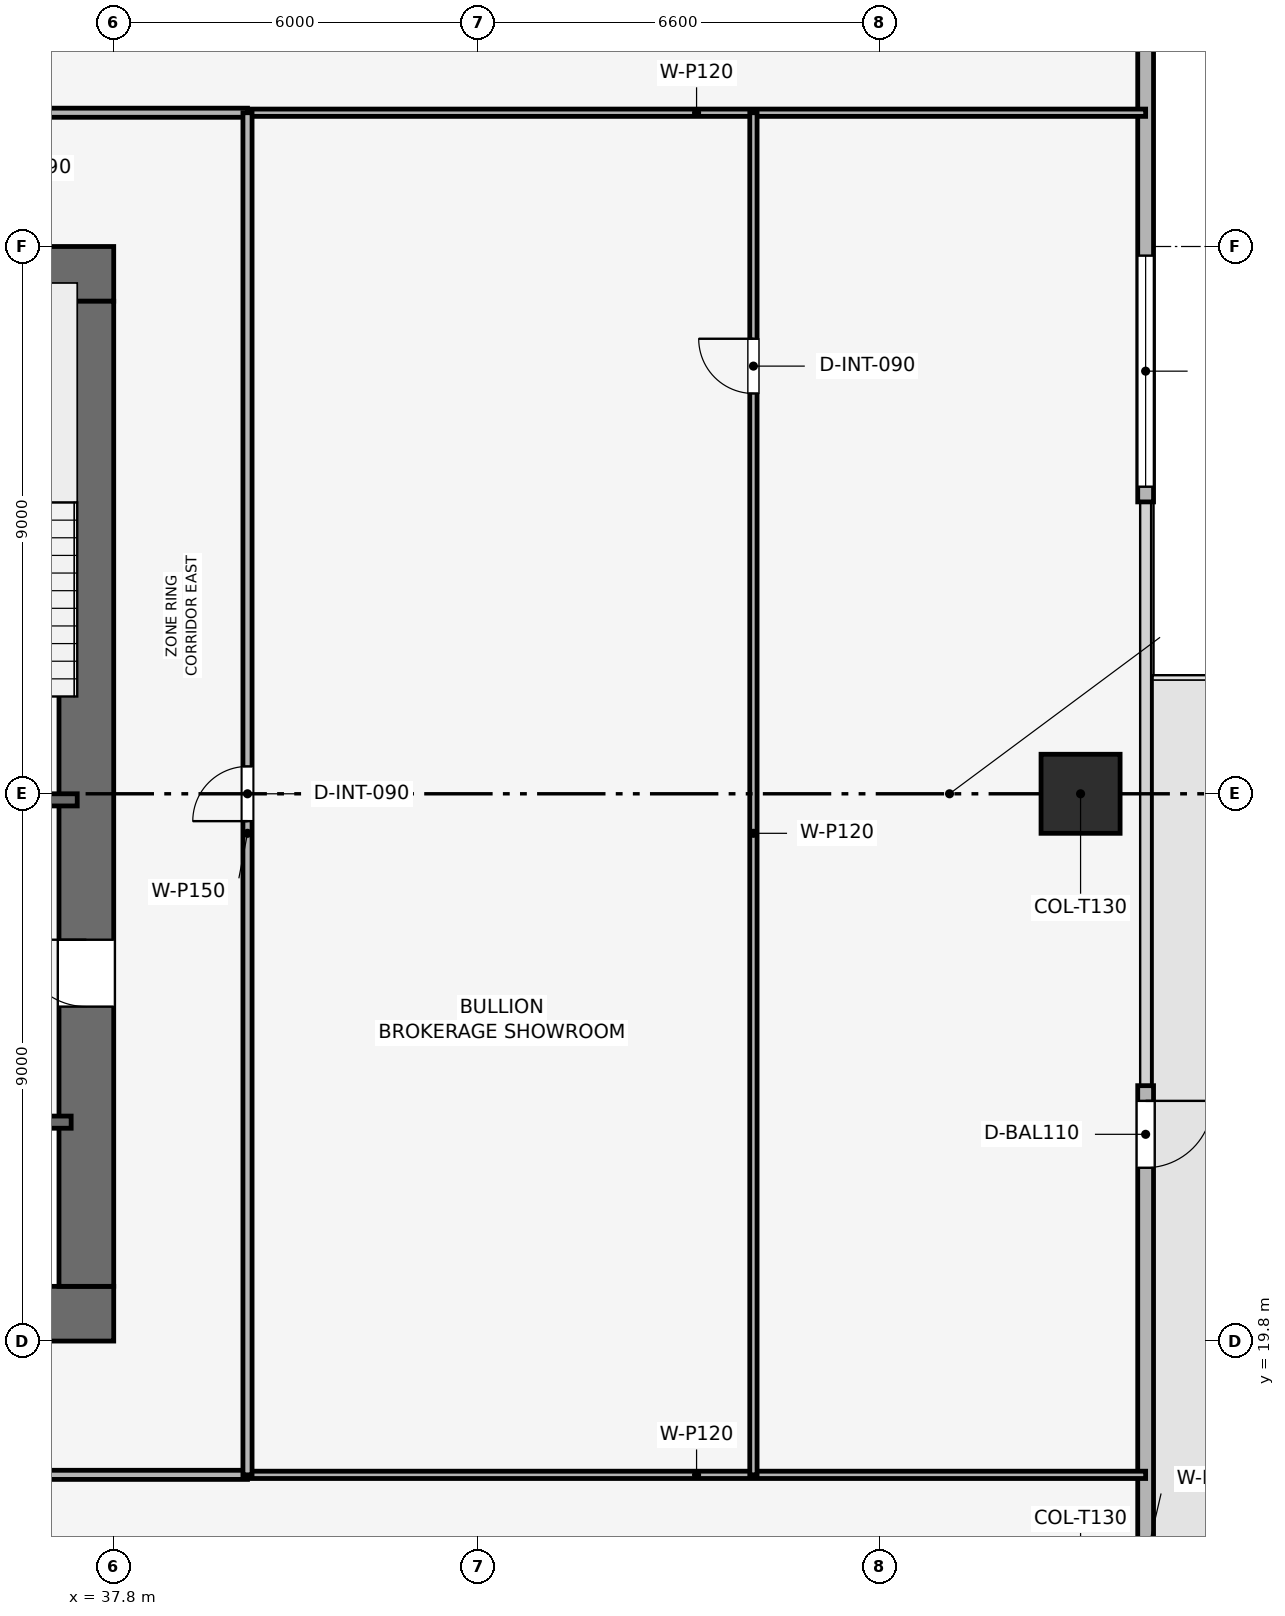
"""IFC4 building model, lengths in metres.
Left out: names, types, materials, properties, quantities, classifications, styles, units other than length and angle.
Written with IfcOpenShell. Run it as: python <this file> out.ifc"""

import sys

from ifc_helpers import new_model, si_unit, direction, frame, frame_2d, origin, origin_2d, place, context, subcontext, project, spatial, rectangle, extrude, element, fill, save


model = new_model("IFC4")
c1 = context("Model", 3, precision=1e-05, world=origin(), true_north=direction((0.0, 1.0)))
c2 = subcontext(c1, "Body", "Model", "MODEL_VIEW")
j1 = project(units=[si_unit("LENGTHUNIT", "METRE"), si_unit("PLANEANGLEUNIT", "RADIAN")], contexts=[c1])
p1 = place(None, origin())
s1 = spatial("IfcSite", under=j1, at=p1, CompositionType="ELEMENT")
p2 = place(p1, origin())
s2 = spatial("IfcBuilding", under=s1, at=p2, CompositionType="ELEMENT")
p3 = place(p2, frame((0.0, 0.0, 125.1)))
s3 = spatial("IfcBuildingStorey", under=s2, at=p3, CompositionType="ELEMENT", Elevation=125.1)
p4 = place(p3, frame((19.8, 20.25, 0.0), z_axis=(0.0, 0.0, 1.0), x_axis=(1.0, 0.0, 0.0)))
e1 = element("IfcWall", 1, at=p4, inside=s3, PredefinedType="SHEAR", context=c2, shape_type="SweptSolid", body=[
    extrude(rectangle(XDim=18.0, YDim=0.9, at=frame_2d((9.0, 0.0))), origin(), (0.0, 0.0, 1.0), 3.9),
])
p5 = place(p4, frame((8.4, 0.0, 0.0)))
e2 = element("IfcOpeningElement", 2, at=p5, cuts=e1, PredefinedType="OPENING", context=c2, shape_type="SweptSolid", body=[
    extrude(rectangle(XDim=1.2, YDim=2.2, at=frame_2d((0.6, 1.1))), frame((0.0, 0.46, 0.0), z_axis=(0.0, -1.0, 0.0), x_axis=(1.0, 0.0, 0.0)), (0.0, 0.0, 1.0), 0.92),
])
p6 = place(p3, frame((19.8, 37.35, 0.0), z_axis=(0.0, 0.0, 1.0), x_axis=(1.0, 0.0, 0.0)))
e3 = element("IfcWall", 3, at=p6, inside=s3, PredefinedType="SHEAR", context=c2, shape_type="SweptSolid", body=[
    extrude(rectangle(XDim=18.0, YDim=0.9, at=frame_2d((9.0, 0.0))), origin(), (0.0, 0.0, 1.0), 3.9),
])
p7 = place(p6, frame((7.05, 0.0, 0.0)))
e4 = element("IfcOpeningElement", 4, at=p7, cuts=e3, PredefinedType="OPENING", context=c2, shape_type="SweptSolid", body=[
    extrude(rectangle(XDim=1.1, YDim=2.15, at=frame_2d((0.55, 1.075))), frame((0.0, 0.46, 0.0), z_axis=(0.0, -1.0, 0.0), x_axis=(1.0, 0.0, 0.0)), (0.0, 0.0, 1.0), 0.92),
])
p8 = place(p3, frame((37.35, 20.7, 0.0), z_axis=(0.0, 0.0, 1.0), x_axis=(0.0, 1.0, 0.0)))
e5 = element("IfcWall", 5, at=p8, inside=s3, PredefinedType="SHEAR", context=c2, shape_type="SweptSolid", body=[
    extrude(rectangle(XDim=16.2, YDim=0.9, at=frame_2d((8.1, 0.0))), origin(), (0.0, 0.0, 1.0), 3.9),
])
p9 = place(p8, frame((4.6, 0.0, 0.0)))
e6 = element("IfcOpeningElement", 6, at=p9, cuts=e5, PredefinedType="OPENING", context=c2, shape_type="SweptSolid", body=[
    extrude(rectangle(XDim=1.1, YDim=2.15, at=frame_2d((0.55, 1.075))), frame((0.0, 0.46, 0.0), z_axis=(0.0, -1.0, 0.0), x_axis=(1.0, 0.0, 0.0)), (0.0, 0.0, 1.0), 0.92),
])
p10 = place(p3, frame((53.7, 28.8, 0.003), z_axis=(0.0, 0.0, 1.0), x_axis=(1.0, 0.0, 0.0)))
e7 = element("IfcColumn", 7, at=p10, inside=s3, PredefinedType="COLUMN", context=c2, shape_type="SweptSolid", body=[
    extrude(rectangle(XDim=1.3, YDim=1.3, at=origin_2d()), origin(), (0.0, 0.0, 1.0), 3.644),
])
p11 = place(p3, frame((54.77, 47.7, 0.0), z_axis=(0.0, 0.0, 1.0), x_axis=(0.0, -1.0, 0.0)))
e8 = element("IfcWall", 8, at=p11, inside=s3, PredefinedType="SOLIDWALL", context=c2, shape_type="SweptSolid", body=[
    extrude(rectangle(XDim=14.1, YDim=0.26, at=frame_2d((7.05, 0.0))), origin(), (0.0, 0.0, 1.0), 3.65),
])
p12 = place(p11, frame((10.05, 0.0, 0.9)))
e9 = element("IfcOpeningElement", 9, at=p12, cuts=e8, PredefinedType="OPENING", context=c2, shape_type="SweptSolid", body=[
    extrude(rectangle(XDim=3.8, YDim=1.9, at=frame_2d((1.9, 0.95))), frame((0.0, 0.14, 0.0), z_axis=(0.0, -1.0, 0.0), x_axis=(1.0, 0.0, 0.0)), (0.0, 0.0, 1.0), 0.28),
])
p13 = place(p3, frame((54.77, 24.0, 0.0), z_axis=(0.0, 0.0, 1.0), x_axis=(0.0, -1.0, 0.0)))
e10 = element("IfcWall", 10, at=p13, inside=s3, PredefinedType="SOLIDWALL", context=c2, shape_type="SweptSolid", body=[
    extrude(rectangle(XDim=14.1, YDim=0.26, at=frame_2d((7.05, 0.0))), origin(), (0.0, 0.0, 1.0), 3.65),
])
p14 = place(p13, frame((0.25, 0.0, 0.0)))
e11 = element("IfcOpeningElement", 11, at=p14, cuts=e10, PredefinedType="OPENING", context=c2, shape_type="SweptSolid", body=[
    extrude(rectangle(XDim=1.1, YDim=2.2, at=frame_2d((0.55, 1.1))), frame((0.0, 0.14, 0.0), z_axis=(0.0, -1.0, 0.0), x_axis=(1.0, 0.0, 0.0)), (0.0, 0.0, 1.0), 0.28),
])
p15 = place(p3, frame((34.05, 28.7, 0.0), z_axis=(0.0, 0.0, 1.0), x_axis=(1.0, 0.0, 0.0)))
e12 = element("IfcWall", 12, at=p15, inside=s3, PredefinedType="SHEAR", context=c2, shape_type="SweptSolid", body=[
    extrude(rectangle(XDim=3.15, YDim=0.2, at=frame_2d((1.575, 0.0))), origin(), (0.0, 0.0, 1.0), 3.65),
])
p16 = place(p15, frame((0.8, 0.0, 0.0)))
e13 = element("IfcOpeningElement", 13, at=p16, cuts=e12, PredefinedType="OPENING", context=c2, shape_type="SweptSolid", body=[
    extrude(rectangle(XDim=1.0, YDim=2.1, at=frame_2d((0.5, 1.05))), frame((0.0, 0.11, 0.0), z_axis=(0.0, -1.0, 0.0), x_axis=(1.0, 0.0, 0.0)), (0.0, 0.0, 1.0), 0.22),
])
p17 = place(p3, frame((34.05, 23.4, 0.0), z_axis=(0.0, 0.0, 1.0), x_axis=(1.0, 0.0, 0.0)))
e14 = element("IfcWall", 14, at=p17, inside=s3, PredefinedType="SHEAR", context=c2, shape_type="SweptSolid", body=[
    extrude(rectangle(XDim=3.05, YDim=0.2, at=frame_2d((1.525, 0.0))), origin(), (0.0, 0.0, 1.0), 3.65),
])
p18 = place(p17, frame((1.2, 0.0, 0.0)))
e15 = element("IfcOpeningElement", 15, at=p18, cuts=e14, PredefinedType="OPENING", context=c2, shape_type="SweptSolid", body=[
    extrude(rectangle(XDim=1.1, YDim=2.15, at=frame_2d((0.55, 1.075))), frame((0.0, 0.11, 0.0), z_axis=(0.0, -1.0, 0.0), x_axis=(1.0, 0.0, 0.0)), (0.0, 0.0, 1.0), 0.22),
])
for number, where, z_axis, x_axis in (
    (16, (40.0, 17.6, 0.0), (0.0, 0.0, 1.0), (1.0, 0.0, 0.0)),
    (17, (40.0, 40.0, 0.0), (0.0, 0.0, 1.0), (1.0, 0.0, 0.0)),
):
    element("IfcWall", number, at=place(p3, frame(where, z_axis=z_axis, x_axis=x_axis)), inside=s3, PredefinedType="PARTITIONING", context=c2, shape_type="SweptSolid", body=[
        extrude(rectangle(XDim=14.77, YDim=0.12, at=frame_2d((7.385, 0.0))), origin(), (0.0, 0.0, 1.0), 3.035),
    ])
p19 = place(p3, frame((48.32, 17.6, 0.0), z_axis=(0.0, 0.0, 1.0), x_axis=(0.0, 1.0, 0.0)))
e18 = element("IfcWall", 18, at=p19, inside=s3, PredefinedType="PARTITIONING", context=c2, shape_type="SweptSolid", body=[
    extrude(rectangle(XDim=22.4, YDim=0.12, at=frame_2d((11.2, 0.0))), origin(), (0.0, 0.0, 1.0), 3.185),
])
p20 = place(p19, frame((17.783, 0.0, 0.0)))
e19 = element("IfcOpeningElement", 19, at=p20, cuts=e18, PredefinedType="OPENING", context=c2, shape_type="SweptSolid", body=[
    extrude(rectangle(XDim=0.9, YDim=2.1, at=frame_2d((0.45, 1.05))), frame((0.0, 0.07, 0.0), z_axis=(0.0, -1.0, 0.0), x_axis=(1.0, 0.0, 0.0)), (0.0, 0.0, 1.0), 0.14),
])
p21 = place(p3, frame((17.6, 17.6, 0.0), z_axis=(0.0, 0.0, 1.0), x_axis=(1.0, 0.0, 0.0)))
e20 = element("IfcWall", 20, at=p21, inside=s3, PredefinedType="PARTITIONING", context=c2, shape_type="SweptSolid", body=[
    extrude(rectangle(XDim=22.4, YDim=0.15, at=frame_2d((11.2, 0.0))), origin(), (0.0, 0.0, 1.0), 3.185),
])
p22 = place(p21, frame((0.7, 0.0, 0.0)))
e21 = element("IfcOpeningElement", 21, at=p22, cuts=e20, PredefinedType="OPENING", context=c2, shape_type="SweptSolid", body=[
    extrude(rectangle(XDim=0.9, YDim=2.1, at=frame_2d((0.45, 1.05))), frame((0.0, 0.085, 0.0), z_axis=(0.0, -1.0, 0.0), x_axis=(1.0, 0.0, 0.0)), (0.0, 0.0, 1.0), 0.17),
])
p23 = place(p21, frame((4.907, 0.0, 0.0)))
e22 = element("IfcOpeningElement", 22, at=p23, cuts=e20, PredefinedType="OPENING", context=c2, shape_type="SweptSolid", body=[
    extrude(rectangle(XDim=0.9, YDim=2.1, at=frame_2d((0.45, 1.05))), frame((0.0, 0.085, 0.0), z_axis=(0.0, -1.0, 0.0), x_axis=(1.0, 0.0, 0.0)), (0.0, 0.0, 1.0), 0.17),
])
p24 = place(p21, frame((10.848, 0.0, 0.0)))
e23 = element("IfcOpeningElement", 23, at=p24, cuts=e20, PredefinedType="OPENING", context=c2, shape_type="SweptSolid", body=[
    extrude(rectangle(XDim=0.9, YDim=2.1, at=frame_2d((0.45, 1.05))), frame((0.0, 0.085, 0.0), z_axis=(0.0, -1.0, 0.0), x_axis=(1.0, 0.0, 0.0)), (0.0, 0.0, 1.0), 0.17),
])
p25 = place(p21, frame((17.84, 0.0, 0.0)))
e24 = element("IfcOpeningElement", 24, at=p25, cuts=e20, PredefinedType="OPENING", context=c2, shape_type="SweptSolid", body=[
    extrude(rectangle(XDim=0.9, YDim=2.1, at=frame_2d((0.45, 1.05))), frame((0.0, 0.085, 0.0), z_axis=(0.0, -1.0, 0.0), x_axis=(1.0, 0.0, 0.0)), (0.0, 0.0, 1.0), 0.17),
])
p26 = place(p3, frame((17.6, 40.0, 0.0), z_axis=(0.0, 0.0, 1.0), x_axis=(1.0, 0.0, 0.0)))
e25 = element("IfcWall", 25, at=p26, inside=s3, PredefinedType="PARTITIONING", context=c2, shape_type="SweptSolid", body=[
    extrude(rectangle(XDim=22.4, YDim=0.15, at=frame_2d((11.2, 0.0))), origin(), (0.0, 0.0, 1.0), 3.185),
])
p27 = place(p26, frame((2.5, 0.0, 0.0)))
e26 = element("IfcOpeningElement", 26, at=p27, cuts=e25, PredefinedType="OPENING", context=c2, shape_type="SweptSolid", body=[
    extrude(rectangle(XDim=0.9, YDim=2.1, at=frame_2d((0.45, 1.05))), frame((0.0, 0.085, 0.0), z_axis=(0.0, -1.0, 0.0), x_axis=(1.0, 0.0, 0.0)), (0.0, 0.0, 1.0), 0.17),
])
p28 = place(p26, frame((6.85, 0.0, 0.0)))
e27 = element("IfcOpeningElement", 27, at=p28, cuts=e25, PredefinedType="OPENING", context=c2, shape_type="SweptSolid", body=[
    extrude(rectangle(XDim=0.9, YDim=2.1, at=frame_2d((0.45, 1.05))), frame((0.0, 0.085, 0.0), z_axis=(0.0, -1.0, 0.0), x_axis=(1.0, 0.0, 0.0)), (0.0, 0.0, 1.0), 0.17),
])
p29 = place(p26, frame((9.75, 0.0, 0.0)))
e28 = element("IfcOpeningElement", 28, at=p29, cuts=e25, PredefinedType="OPENING", context=c2, shape_type="SweptSolid", body=[
    extrude(rectangle(XDim=0.9, YDim=2.1, at=frame_2d((0.45, 1.05))), frame((0.0, 0.085, 0.0), z_axis=(0.0, -1.0, 0.0), x_axis=(1.0, 0.0, 0.0)), (0.0, 0.0, 1.0), 0.17),
])
p30 = place(p26, frame((12.5, 0.0, 0.0)))
e29 = element("IfcOpeningElement", 29, at=p30, cuts=e25, PredefinedType="OPENING", context=c2, shape_type="SweptSolid", body=[
    extrude(rectangle(XDim=0.95, YDim=2.1, at=frame_2d((0.475, 1.05))), frame((0.0, 0.085, 0.0), z_axis=(0.0, -1.0, 0.0), x_axis=(1.0, 0.0, 0.0)), (0.0, 0.0, 1.0), 0.17),
])
p31 = place(p26, frame((17.9, 0.0, 0.0)))
e30 = element("IfcOpeningElement", 30, at=p31, cuts=e25, PredefinedType="OPENING", context=c2, shape_type="SweptSolid", body=[
    extrude(rectangle(XDim=0.9, YDim=2.1, at=frame_2d((0.45, 1.05))), frame((0.0, 0.085, 0.0), z_axis=(0.0, -1.0, 0.0), x_axis=(1.0, 0.0, 0.0)), (0.0, 0.0, 1.0), 0.17),
])
p32 = place(p3, frame((40.0, 17.6, 0.0), z_axis=(0.0, 0.0, 1.0), x_axis=(0.0, 1.0, 0.0)))
e31 = element("IfcWall", 31, at=p32, inside=s3, PredefinedType="PARTITIONING", context=c2, shape_type="SweptSolid", body=[
    extrude(rectangle(XDim=22.4, YDim=0.15, at=frame_2d((11.2, 0.0))), origin(), (0.0, 0.0, 1.0), 3.185),
])
p33 = place(p32, frame((10.75, 0.0, 0.0)))
e32 = element("IfcOpeningElement", 32, at=p33, cuts=e31, PredefinedType="OPENING", context=c2, shape_type="SweptSolid", body=[
    extrude(rectangle(XDim=0.9, YDim=2.1, at=frame_2d((0.45, 1.05))), frame((0.0, 0.085, 0.0), z_axis=(0.0, -1.0, 0.0), x_axis=(1.0, 0.0, 0.0)), (0.0, 0.0, 1.0), 0.17),
])
p34 = place(p14, origin())
e33 = element("IfcDoor", 33, at=p34, inside=s3, OperationType="SINGLE_SWING_LEFT", PredefinedType="DOOR", context=c2, shape_type="SweptSolid", body=[
    extrude(rectangle(XDim=1.1, YDim=2.2, at=frame_2d((0.55, 1.1))), frame((0.0, 0.025, 0.0), z_axis=(0.0, -1.0, 0.0), x_axis=(1.0, 0.0, 0.0)), (0.0, 0.0, 1.0), 0.05),
])
fill(e11, e33)
p35 = place(p12, origin())
e34 = element("IfcWindow", 34, at=p35, inside=s3, PartitioningType="SINGLE_PANEL", PredefinedType="WINDOW", context=c2, shape_type="SweptSolid", body=[
    extrude(rectangle(XDim=3.8, YDim=1.9, at=frame_2d((1.9, 0.95))), frame((0.0, 0.03, 0.0), z_axis=(0.0, -1.0, 0.0), x_axis=(1.0, 0.0, 0.0)), (0.0, 0.0, 1.0), 0.06),
])
fill(e9, e34)
p36 = place(p20, origin())
e35 = element("IfcDoor", 35, at=p36, inside=s3, OperationType="SINGLE_SWING_RIGHT", PredefinedType="DOOR", context=c2, shape_type="SweptSolid", body=[
    extrude(rectangle(XDim=0.9, YDim=2.1, at=frame_2d((0.45, 1.05))), frame((0.0, 0.025, 0.0), z_axis=(0.0, -1.0, 0.0), x_axis=(1.0, 0.0, 0.0)), (0.0, 0.0, 1.0), 0.05),
])
fill(e19, e35)
p37 = place(p33, origin())
e36 = element("IfcDoor", 36, at=p37, inside=s3, OperationType="SINGLE_SWING_LEFT", PredefinedType="DOOR", context=c2, shape_type="SweptSolid", body=[
    extrude(rectangle(XDim=0.9, YDim=2.1, at=frame_2d((0.45, 1.05))), frame((0.0, 0.025, 0.0), z_axis=(0.0, -1.0, 0.0), x_axis=(1.0, 0.0, 0.0)), (0.0, 0.0, 1.0), 0.05),
])
fill(e32, e36)
p38 = place(p9, origin())
e37 = element("IfcDoor", 37, at=p38, inside=s3, OperationType="SINGLE_SWING_RIGHT", PredefinedType="DOOR", context=c2, shape_type="SweptSolid", body=[
    extrude(rectangle(XDim=1.1, YDim=2.15, at=frame_2d((0.55, 1.075))), frame((0.0, 0.025, 0.0), z_axis=(0.0, -1.0, 0.0), x_axis=(1.0, 0.0, 0.0)), (0.0, 0.0, 1.0), 0.05),
])
fill(e6, e37)
save(model, sys.argv[1])
